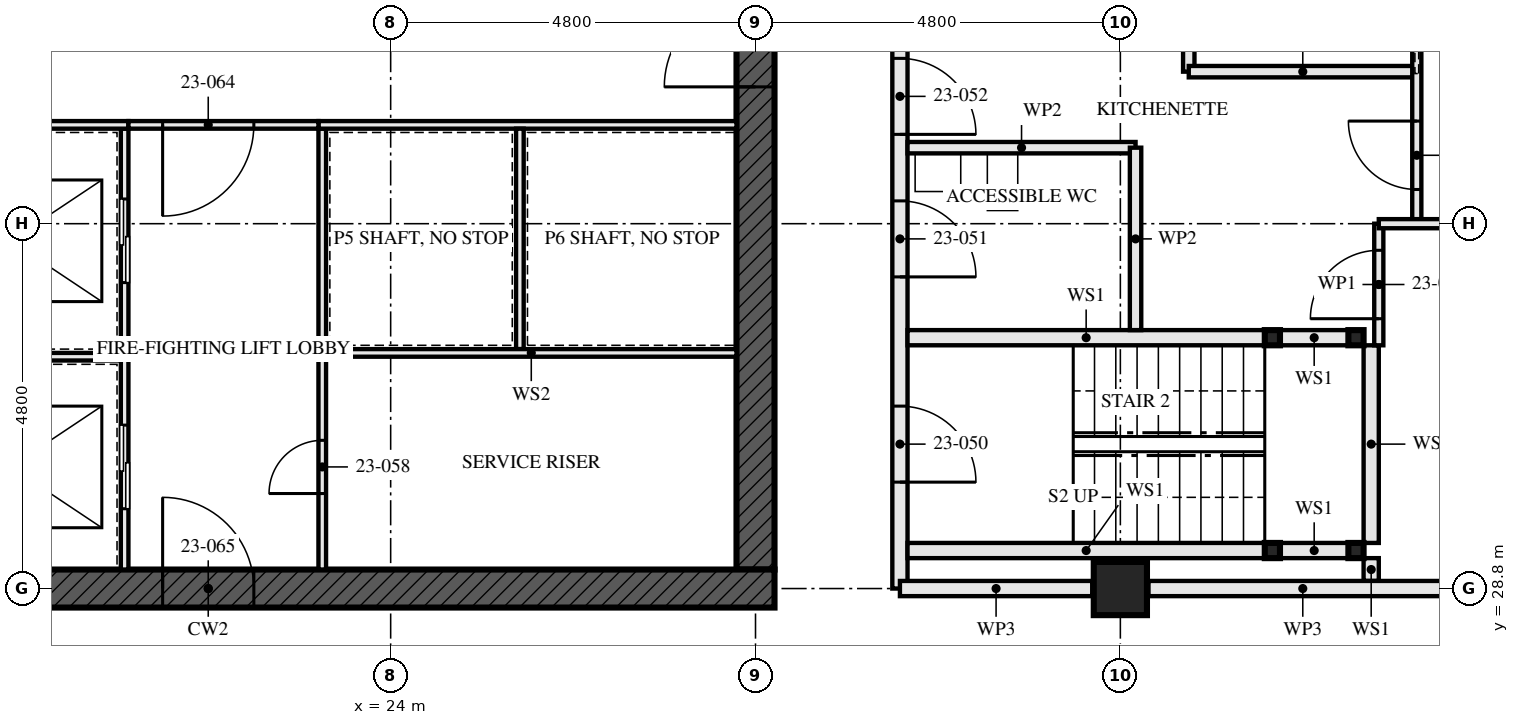
"""IFC4 building model, lengths in metres.
Left out: names, types, materials, properties, quantities, classifications, styles, units other than length and angle.
Written with IfcOpenShell. Run it as: python <this file> out.ifc"""

import sys

from ifc_helpers import new_model, si_unit, direction, frame, frame_2d, origin, origin_2d, place, context, subcontext, project, spatial, rectangle, hollow_rectangle, extrude, element, fill, save


model = new_model("IFC4")
c1 = context("Model", 3, precision=1e-05, world=origin(), true_north=direction((0.0, 1.0)))
c2 = subcontext(c1, "Body", "Model", "MODEL_VIEW")
j1 = project(units=[si_unit("LENGTHUNIT", "METRE"), si_unit("PLANEANGLEUNIT", "RADIAN")], contexts=[c1])
p1 = place(None, origin())
s1 = spatial("IfcSite", under=j1, at=p1, CompositionType="ELEMENT")
p2 = place(p1, origin())
s2 = spatial("IfcBuilding", under=s1, at=p2, CompositionType="ELEMENT")
p3 = place(p2, frame((0.0, 0.0, 87.5)))
s3 = spatial("IfcBuildingStorey", under=s2, at=p3, CompositionType="ELEMENT", Elevation=87.5)
p4 = place(p3, frame((33.6, 28.8, 0.0), z_axis=(0.0, 0.0, 1.0), x_axis=(0.0, 1.0, 0.0)))
e1 = element("IfcColumn", 1, at=p4, inside=s3, PredefinedType="COLUMN", context=c2, shape_type="SweptSolid", body=[
    extrude(hollow_rectangle(XDim=0.7, YDim=0.7, WallThickness=0.06, at=origin_2d()), origin(), (0.0, 0.0, 1.0), 3.5),
])
p5 = place(p3, frame((14.15, 28.8, -0.17), z_axis=(0.0, 0.0, 1.0), x_axis=(1.0, 0.0, 0.0)))
e2 = element("IfcWall", 2, at=p5, inside=s3, PredefinedType="SHEAR", context=c2, shape_type="SweptSolid", body=[
    extrude(rectangle(XDim=14.9, YDim=0.5, at=frame_2d((7.45, 0.0))), origin(), (0.0, 0.0, 1.0), 3.5),
])
p6 = place(p5, frame((6.85, 0.0, 0.17)))
e3 = element("IfcOpeningElement", 3, at=p6, cuts=e2, PredefinedType="OPENING", context=c2, shape_type="SweptSolid", body=[
    extrude(rectangle(XDim=1.2, YDim=2.1, at=frame_2d((0.6, 1.05))), frame((0.0, 0.26, 0.0), z_axis=(0.0, -1.0, 0.0), x_axis=(1.0, 0.0, 0.0)), (0.0, 0.0, 1.0), 0.521),
])
p7 = place(p3, frame((28.8, 29.05, -0.17), z_axis=(0.0, 0.0, 1.0), x_axis=(0.0, 1.0, 0.0)))
e4 = element("IfcWall", 4, at=p7, inside=s3, PredefinedType="SHEAR", context=c2, shape_type="SweptSolid", body=[
    extrude(rectangle(XDim=13.9, YDim=0.5, at=frame_2d((6.95, 0.0))), origin(), (0.0, 0.0, 1.0), 3.5),
])
p8 = place(p7, frame((6.35, 0.0, 0.17)))
e5 = element("IfcOpeningElement", 5, at=p8, cuts=e4, PredefinedType="OPENING", context=c2, shape_type="SweptSolid", body=[
    extrude(rectangle(XDim=1.2, YDim=2.1, at=frame_2d((0.6, 1.05))), frame((0.0, 0.26, 0.0), z_axis=(0.0, -1.0, 0.0), x_axis=(1.0, 0.0, 0.0)), (0.0, 0.0, 1.0), 0.521),
])
for number, where, z_axis, x_axis in (
    (6, (36.7, 29.3, 0.0), (0.0, 0.0, 1.0), (1.0, 0.0, 0.0)),
    (7, (36.7, 32.1, 0.0), (0.0, 0.0, 1.0), (1.0, 0.0, 0.0)),
    (8, (35.6, 29.3, 0.0), (0.0, 0.0, 1.0), (1.0, 0.0, 0.0)),
    (9, (35.6, 32.1, 0.0), (0.0, 0.0, 1.0), (1.0, 0.0, 0.0)),
):
    element("IfcColumn", number, at=place(p3, frame(where, z_axis=z_axis, x_axis=x_axis)), inside=s3, PredefinedType="COLUMN", context=c2, shape_type="SweptSolid", body=[
        extrude(hollow_rectangle(XDim=0.2, YDim=0.2, WallThickness=0.008, at=origin_2d()), origin(), (0.0, 0.0, 1.0), 3.33),
    ])
p9 = place(p3, frame((36.6, 29.3, 0.0), z_axis=(0.0, 0.0, 1.0), x_axis=(-1.0, 0.0, 0.0)))
e10 = element("IfcWall", 10, at=p9, inside=s3, PredefinedType="SOLIDWALL", context=c2, shape_type="SweptSolid", body=[
    extrude(rectangle(XDim=0.9, YDim=0.2, at=frame_2d((0.45, 0.0))), origin(), (0.0, 0.0, 1.0), 2.99),
])
p10 = place(p3, frame((35.5, 29.3, 0.0), z_axis=(0.0, 0.0, 1.0), x_axis=(-1.0, 0.0, 0.0)))
e11 = element("IfcWall", 11, at=p10, inside=s3, PredefinedType="SOLIDWALL", context=c2, shape_type="SweptSolid", body=[
    extrude(rectangle(XDim=4.7, YDim=0.2, at=frame_2d((2.35, 0.0))), origin(), (0.0, 0.0, 1.0), 2.99),
])
p11 = place(p3, frame((36.6, 32.1, 0.0), z_axis=(0.0, 0.0, 1.0), x_axis=(-1.0, 0.0, 0.0)))
e12 = element("IfcWall", 12, at=p11, inside=s3, PredefinedType="SOLIDWALL", context=c2, shape_type="SweptSolid", body=[
    extrude(rectangle(XDim=0.9, YDim=0.2, at=frame_2d((0.45, 0.0))), origin(), (0.0, 0.0, 1.0), 2.99),
])
p12 = place(p3, frame((35.5, 32.1, 0.0), z_axis=(0.0, 0.0, 1.0), x_axis=(-1.0, 0.0, 0.0)))
e13 = element("IfcWall", 13, at=p12, inside=s3, PredefinedType="SOLIDWALL", context=c2, shape_type="SweptSolid", body=[
    extrude(rectangle(XDim=4.7, YDim=0.2, at=frame_2d((2.35, 0.0))), origin(), (0.0, 0.0, 1.0), 2.99),
])
p13 = place(p3, frame((36.9, 28.9, 0.0), z_axis=(0.0, 0.0, 1.0), x_axis=(0.0, 1.0, 0.0)))
e14 = element("IfcWall", 14, at=p13, inside=s3, PredefinedType="SOLIDWALL", context=c2, shape_type="SweptSolid", body=[
    extrude(rectangle(XDim=0.3, YDim=0.2, at=frame_2d((0.15, 0.0))), origin(), (0.0, 0.0, 1.0), 3.33),
])
p14 = place(p3, frame((36.9, 29.4, 0.0), z_axis=(0.0, 0.0, 1.0), x_axis=(0.0, 1.0, 0.0)))
e15 = element("IfcWall", 15, at=p14, inside=s3, PredefinedType="SOLIDWALL", context=c2, shape_type="SweptSolid", body=[
    extrude(rectangle(XDim=2.6, YDim=0.2, at=frame_2d((1.3, 0.0))), origin(), (0.0, 0.0, 1.0), 3.33),
])
p15 = place(p3, frame((33.8, 32.2, 0.0), z_axis=(0.0, 0.0, 1.0), x_axis=(0.0, 1.0, 0.0)))
e16 = element("IfcWall", 16, at=p15, inside=s3, PredefinedType="PARTITIONING", context=c2, shape_type="SweptSolid", body=[
    extrude(rectangle(XDim=2.4, YDim=0.15, at=frame_2d((1.2, 0.0))), origin(), (0.0, 0.0, 1.0), 2.55),
])
for number, where, z_axis, x_axis in (
    (17, (33.8, 34.6, 0.0), (0.0, 0.0, 1.0), (-1.0, 0.0, 0.0)),
    (18, (37.5, 35.6, 0.0), (0.0, 0.0, 1.0), (-1.0, 0.0, 0.0)),
):
    element("IfcWall", number, at=place(p3, frame(where, z_axis=z_axis, x_axis=x_axis)), inside=s3, PredefinedType="PARTITIONING", context=c2, shape_type="SweptSolid", body=[
        extrude(rectangle(XDim=3.0, YDim=0.15, at=frame_2d((1.5, 0.0))), origin(), (0.0, 0.0, 1.0), 3.33),
    ])
p16 = place(p3, frame((34.5, 35.6, 0.0), z_axis=(0.0, 0.0, 1.0), x_axis=(0.0, 1.0, 0.0)))
e19 = element("IfcWall", 19, at=p16, inside=s3, PredefinedType="PARTITIONING", context=c2, shape_type="SweptSolid", body=[
    extrude(rectangle(XDim=2.8, YDim=0.15, at=frame_2d((1.4, 0.0))), origin(), (0.0, 0.0, 1.0), 3.33),
])
p17 = place(p3, frame((37.0, 32.0, 0.0), z_axis=(0.0, 0.0, 1.0), x_axis=(0.0, 1.0, 0.0)))
e20 = element("IfcWall", 20, at=p17, inside=s3, PredefinedType="PARTITIONING", context=c2, shape_type="SweptSolid", body=[
    extrude(rectangle(XDim=1.6, YDim=0.12, at=frame_2d((0.8, 0.0))), origin(), (0.0, 0.0, 1.0), 3.33),
])
p18 = place(p17, frame((0.35, 0.0, 0.0)))
e21 = element("IfcOpeningElement", 21, at=p18, cuts=e20, PredefinedType="OPENING", context=c2, shape_type="SweptSolid", body=[
    extrude(rectangle(XDim=0.9, YDim=2.1, at=frame_2d((0.45, 1.05))), frame((0.0, 0.071, 0.0), z_axis=(0.0, -1.0, 0.0), x_axis=(1.0, 0.0, 0.0)), (0.0, 0.0, 1.0), 0.141),
])
p19 = place(p3, frame((37.5, 33.6, 0.0), z_axis=(0.0, 0.0, 1.0), x_axis=(0.0, 1.0, 0.0)))
e22 = element("IfcWall", 22, at=p19, inside=s3, PredefinedType="PARTITIONING", context=c2, shape_type="SweptSolid", body=[
    extrude(rectangle(XDim=4.8, YDim=0.12, at=frame_2d((2.4, 0.0))), origin(), (0.0, 0.0, 1.0), 3.33),
])
p20 = place(p19, frame((0.45, 0.0, 0.0)))
e23 = element("IfcOpeningElement", 23, at=p20, cuts=e22, PredefinedType="OPENING", context=c2, shape_type="SweptSolid", body=[
    extrude(rectangle(XDim=0.9, YDim=2.1, at=frame_2d((0.45, 1.05))), frame((0.0, 0.071, 0.0), z_axis=(0.0, -1.0, 0.0), x_axis=(1.0, 0.0, 0.0)), (0.0, 0.0, 1.0), 0.141),
])
p21 = place(p19, frame((2.925, 0.0, 0.0)))
e24 = element("IfcOpeningElement", 24, at=p21, cuts=e22, PredefinedType="OPENING", context=c2, shape_type="SweptSolid", body=[
    extrude(rectangle(XDim=0.95, YDim=2.1, at=frame_2d((0.475, 1.05))), frame((0.0, 0.071, 0.0), z_axis=(0.0, -1.0, 0.0), x_axis=(1.0, 0.0, 0.0)), (0.0, 0.0, 1.0), 0.141),
])
p22 = place(p3, frame((42.855, 33.6, 0.0), z_axis=(0.0, 0.0, 1.0), x_axis=(-1.0, 0.0, 0.0)))
e25 = element("IfcWall", 25, at=p22, inside=s3, PredefinedType="PARTITIONING", context=c2, shape_type="SweptSolid", body=[
    extrude(rectangle(XDim=5.855, YDim=0.12, at=frame_2d((2.927, 0.0))), origin(), (0.0, 0.0, 1.0), 2.55),
])
p23 = place(p3, frame((30.7, 28.8, 0.0), z_axis=(0.0, 0.0, 1.0), x_axis=(0.0, 1.0, 0.0)))
e26 = element("IfcWall", 26, at=p23, inside=s3, PredefinedType="PARTITIONING", context=c2, shape_type="SweptSolid", body=[
    extrude(rectangle(XDim=14.84, YDim=0.2, at=frame_2d((7.42, 0.0))), origin(), (0.0, 0.0, 1.0), 2.32),
])
p24 = place(p23, frame((1.4, 0.0, 0.0)))
e27 = element("IfcOpeningElement", 27, at=p24, cuts=e26, PredefinedType="OPENING", context=c2, shape_type="SweptSolid", body=[
    extrude(rectangle(XDim=1.0, YDim=2.1, at=frame_2d((0.5, 1.05))), frame((0.0, 0.111, 0.0), z_axis=(0.0, -1.0, 0.0), x_axis=(1.0, 0.0, 0.0)), (0.0, 0.0, 1.0), 0.221),
])
p25 = place(p23, frame((4.1, 0.0, 0.0)))
e28 = element("IfcOpeningElement", 28, at=p25, cuts=e26, PredefinedType="OPENING", context=c2, shape_type="SweptSolid", body=[
    extrude(rectangle(XDim=1.0, YDim=2.1, at=frame_2d((0.5, 1.05))), frame((0.0, 0.111, 0.0), z_axis=(0.0, -1.0, 0.0), x_axis=(1.0, 0.0, 0.0)), (0.0, 0.0, 1.0), 0.221),
])
p26 = place(p23, frame((5.975, 0.0, 0.0)))
e29 = element("IfcOpeningElement", 29, at=p26, cuts=e26, PredefinedType="OPENING", context=c2, shape_type="SweptSolid", body=[
    extrude(rectangle(XDim=1.0, YDim=2.1, at=frame_2d((0.5, 1.05))), frame((0.0, 0.111, 0.0), z_axis=(0.0, -1.0, 0.0), x_axis=(1.0, 0.0, 0.0)), (0.0, 0.0, 1.0), 0.221),
])
p27 = place(p23, frame((13.0, 0.0, 0.0)))
e30 = element("IfcOpeningElement", 30, at=p27, cuts=e26, PredefinedType="OPENING", context=c2, shape_type="SweptSolid", body=[
    extrude(rectangle(XDim=1.0, YDim=2.1, at=frame_2d((0.5, 1.05))), frame((0.0, 0.111, 0.0), z_axis=(0.0, -1.0, 0.0), x_axis=(1.0, 0.0, 0.0)), (0.0, 0.0, 1.0), 0.221),
])
p28 = place(p3, frame((20.5, 29.05, 0.0), z_axis=(0.0, 0.0, 1.0), x_axis=(0.0, 1.0, 0.0)))
e31 = element("IfcWall", 31, at=p28, inside=s3, PredefinedType="SOLIDWALL", context=c2, shape_type="SweptSolid", body=[
    extrude(rectangle(XDim=5.8, YDim=0.1, at=frame_2d((2.9, 0.0))), origin(), (0.0, 0.0, 1.0), 3.33),
])
p29 = place(p28, frame((0.8, 0.0, 0.0)))
e32 = element("IfcOpeningElement", 32, at=p29, cuts=e31, PredefinedType="OPENING", context=c2, shape_type="SweptSolid", body=[
    extrude(rectangle(XDim=1.1, YDim=2.3, at=frame_2d((0.55, 1.15))), frame((0.0, 0.061, 0.0), z_axis=(0.0, -1.0, 0.0), x_axis=(1.0, 0.0, 0.0)), (0.0, 0.0, 1.0), 0.121),
])
p30 = place(p28, frame((3.775, 0.0, 0.0)))
e33 = element("IfcOpeningElement", 33, at=p30, cuts=e31, PredefinedType="OPENING", context=c2, shape_type="SweptSolid", body=[
    extrude(rectangle(XDim=1.1, YDim=2.3, at=frame_2d((0.55, 1.15))), frame((0.0, 0.061, 0.0), z_axis=(0.0, -1.0, 0.0), x_axis=(1.0, 0.0, 0.0)), (0.0, 0.0, 1.0), 0.121),
])
p31 = place(p3, frame((23.1, 29.05, 0.0), z_axis=(0.0, 0.0, 1.0), x_axis=(0.0, 1.0, 0.0)))
e34 = element("IfcWall", 34, at=p31, inside=s3, PredefinedType="SOLIDWALL", context=c2, shape_type="SweptSolid", body=[
    extrude(rectangle(XDim=5.8, YDim=0.1, at=frame_2d((2.9, 0.0))), origin(), (0.0, 0.0, 1.0), 3.33),
])
p32 = place(p31, frame((1.0, 0.0, 0.0)))
e35 = element("IfcOpeningElement", 35, at=p32, cuts=e34, PredefinedType="OPENING", context=c2, shape_type="SweptSolid", body=[
    extrude(rectangle(XDim=0.7, YDim=2.1, at=frame_2d((0.35, 1.05))), frame((0.0, 0.061, 0.0), z_axis=(0.0, -1.0, 0.0), x_axis=(1.0, 0.0, 0.0)), (0.0, 0.0, 1.0), 0.121),
])
p33 = place(p3, frame((14.65, 34.9, 0.0), z_axis=(0.0, 0.0, 1.0), x_axis=(1.0, 0.0, 0.0)))
e36 = element("IfcWall", 36, at=p33, inside=s3, PredefinedType="SOLIDWALL", context=c2, shape_type="SweptSolid", body=[
    extrude(rectangle(XDim=5.9, YDim=0.1, at=frame_2d((2.95, 0.0))), origin(), (0.0, 0.0, 1.0), 3.33),
])
p34 = place(p33, frame((1.6, 0.0, 0.0)))
e37 = element("IfcOpeningElement", 37, at=p34, cuts=e36, PredefinedType="OPENING", context=c2, shape_type="SweptSolid", body=[
    extrude(rectangle(XDim=0.7, YDim=2.1, at=frame_2d((0.35, 1.05))), frame((0.0, 0.061, 0.0), z_axis=(0.0, -1.0, 0.0), x_axis=(1.0, 0.0, 0.0)), (0.0, 0.0, 1.0), 0.121),
])
p35 = place(p3, frame((23.05, 34.9, 0.0), z_axis=(0.0, 0.0, 1.0), x_axis=(1.0, 0.0, 0.0)))
e38 = element("IfcWall", 38, at=p35, inside=s3, PredefinedType="SOLIDWALL", context=c2, shape_type="SweptSolid", body=[
    extrude(rectangle(XDim=5.5, YDim=0.1, at=frame_2d((2.75, 0.0))), origin(), (0.0, 0.0, 1.0), 3.33),
])
p36 = place(p3, frame((20.55, 34.9, 0.0), z_axis=(0.0, 0.0, 1.0), x_axis=(1.0, 0.0, 0.0)))
e39 = element("IfcWall", 39, at=p36, inside=s3, PredefinedType="SOLIDWALL", context=c2, shape_type="SweptSolid", body=[
    extrude(rectangle(XDim=2.5, YDim=0.1, at=frame_2d((1.25, 0.0))), origin(), (0.0, 0.0, 1.0), 3.33),
])
p37 = place(p36, frame((0.45, 0.0, 0.0)))
e40 = element("IfcOpeningElement", 40, at=p37, cuts=e39, PredefinedType="OPENING", context=c2, shape_type="SweptSolid", body=[
    extrude(rectangle(XDim=1.2, YDim=2.1, at=frame_2d((0.6, 1.05))), frame((0.0, 0.061, 0.0), z_axis=(0.0, -1.0, 0.0), x_axis=(1.0, 0.0, 0.0)), (0.0, 0.0, 1.0), 0.121),
])
p38 = place(p3, frame((17.55, 31.85, 0.0), z_axis=(0.0, 0.0, 1.0), x_axis=(1.0, 0.0, 0.0)))
e41 = element("IfcWall", 41, at=p38, inside=s3, PredefinedType="SOLIDWALL", context=c2, shape_type="SweptSolid", body=[
    extrude(rectangle(XDim=2.9, YDim=0.1, at=frame_2d((1.45, 0.0))), origin(), (0.0, 0.0, 1.0), 3.33),
])
p39 = place(p3, frame((25.7, 31.95, 0.0), z_axis=(0.0, 0.0, 1.0), x_axis=(0.0, 1.0, 0.0)))
e42 = element("IfcWall", 42, at=p39, inside=s3, PredefinedType="SOLIDWALL", context=c2, shape_type="SweptSolid", body=[
    extrude(rectangle(XDim=2.9, YDim=0.1, at=frame_2d((1.45, 0.0))), origin(), (0.0, 0.0, 1.0), 3.33),
])
p40 = place(p3, frame((23.15, 31.9, 0.0), z_axis=(0.0, 0.0, 1.0), x_axis=(1.0, 0.0, 0.0)))
e43 = element("IfcWall", 43, at=p40, inside=s3, PredefinedType="SOLIDWALL", context=c2, shape_type="SweptSolid", body=[
    extrude(rectangle(XDim=5.4, YDim=0.1, at=frame_2d((2.7, 0.0))), origin(), (0.0, 0.0, 1.0), 3.33),
])
p41 = place(p3, frame((38.03, 28.8, 0.0), z_axis=(0.0, 0.0, 1.0), x_axis=(-1.0, 0.0, 0.0)))
e44 = element("IfcWall", 44, at=p41, inside=s3, PredefinedType="PARTITIONING", context=c2, shape_type="SweptSolid", body=[
    extrude(rectangle(XDim=4.06, YDim=0.2, at=frame_2d((2.03, 0.0))), origin(), (0.0, 0.0, 1.0), 2.32),
])
p42 = place(p3, frame((33.23, 28.8, 0.0), z_axis=(0.0, 0.0, 1.0), x_axis=(-1.0, 0.0, 0.0)))
e45 = element("IfcWall", 45, at=p42, inside=s3, PredefinedType="PARTITIONING", context=c2, shape_type="SweptSolid", body=[
    extrude(rectangle(XDim=2.53, YDim=0.2, at=frame_2d((1.265, 0.0))), origin(), (0.0, 0.0, 1.0), 2.32),
])
p43 = place(p18, origin())
e46 = element("IfcDoor", 46, at=p43, inside=s3, OperationType="SINGLE_SWING_RIGHT", PredefinedType="DOOR", context=c2, shape_type="SweptSolid", body=[
    extrude(rectangle(XDim=0.9, YDim=2.1, at=frame_2d((0.45, 1.05))), frame((0.0, 0.022, 0.0), z_axis=(0.0, -1.0, 0.0), x_axis=(1.0, 0.0, 0.0)), (0.0, 0.0, 1.0), 0.044),
])
fill(e21, e46)
p44 = place(p20, origin())
e47 = element("IfcDoor", 47, at=p44, inside=s3, OperationType="SINGLE_SWING_LEFT", PredefinedType="DOOR", context=c2, shape_type="SweptSolid", body=[
    extrude(rectangle(XDim=0.9, YDim=2.1, at=frame_2d((0.45, 1.05))), frame((0.0, 0.022, 0.0), z_axis=(0.0, -1.0, 0.0), x_axis=(1.0, 0.0, 0.0)), (0.0, 0.0, 1.0), 0.044),
])
fill(e23, e47)
p45 = place(p24, frame((1.0, 0.0, 0.0), z_axis=(0.0, 0.0, 1.0), x_axis=(-1.0, 0.0, 0.0)))
e48 = element("IfcDoor", 48, at=p45, inside=s3, OperationType="SINGLE_SWING_LEFT", PredefinedType="DOOR", context=c2, shape_type="SweptSolid", body=[
    extrude(rectangle(XDim=1.0, YDim=2.1, at=frame_2d((0.5, 1.05))), frame((0.0, 0.032, 0.0), z_axis=(0.0, -1.0, 0.0), x_axis=(1.0, 0.0, 0.0)), (0.0, 0.0, 1.0), 0.064),
])
fill(e27, e48)
p46 = place(p25, frame((1.0, 0.0, 0.0), z_axis=(0.0, 0.0, 1.0), x_axis=(-1.0, 0.0, 0.0)))
e49 = element("IfcDoor", 49, at=p46, inside=s3, OperationType="SINGLE_SWING_LEFT", PredefinedType="DOOR", context=c2, shape_type="SweptSolid", body=[
    extrude(rectangle(XDim=1.0, YDim=2.1, at=frame_2d((0.5, 1.05))), frame((0.0, 0.027, 0.0), z_axis=(0.0, -1.0, 0.0), x_axis=(1.0, 0.0, 0.0)), (0.0, 0.0, 1.0), 0.054),
])
fill(e28, e49)
p47 = place(p26, frame((1.0, 0.0, 0.0), z_axis=(0.0, 0.0, 1.0), x_axis=(-1.0, 0.0, 0.0)))
e50 = element("IfcDoor", 50, at=p47, inside=s3, OperationType="SINGLE_SWING_LEFT", PredefinedType="DOOR", context=c2, shape_type="SweptSolid", body=[
    extrude(rectangle(XDim=1.0, YDim=2.1, at=frame_2d((0.5, 1.05))), frame((0.0, 0.027, 0.0), z_axis=(0.0, -1.0, 0.0), x_axis=(1.0, 0.0, 0.0)), (0.0, 0.0, 1.0), 0.054),
])
fill(e29, e50)
p48 = place(p29, origin())
e51 = element("IfcDoor", 51, at=p48, inside=s3, OperationType="SLIDING_TO_LEFT", PredefinedType="DOOR", context=c2, shape_type="SweptSolid", body=[
    extrude(rectangle(XDim=1.1, YDim=2.3, at=frame_2d((0.55, 1.15))), frame((0.0, 0.05, 0.0), z_axis=(0.0, -1.0, 0.0), x_axis=(1.0, 0.0, 0.0)), (0.0, 0.0, 1.0), 0.1),
])
fill(e32, e51)
p49 = place(p30, origin())
e52 = element("IfcDoor", 52, at=p49, inside=s3, OperationType="SLIDING_TO_LEFT", PredefinedType="DOOR", context=c2, shape_type="SweptSolid", body=[
    extrude(rectangle(XDim=1.1, YDim=2.3, at=frame_2d((0.55, 1.15))), frame((0.0, 0.05, 0.0), z_axis=(0.0, -1.0, 0.0), x_axis=(1.0, 0.0, 0.0)), (0.0, 0.0, 1.0), 0.1),
])
fill(e33, e52)
p50 = place(p32, origin())
e53 = element("IfcDoor", 53, at=p50, inside=s3, OperationType="SINGLE_SWING_RIGHT", PredefinedType="DOOR", context=c2, shape_type="SweptSolid", body=[
    extrude(rectangle(XDim=0.7, YDim=2.1, at=frame_2d((0.35, 1.05))), frame((0.0, 0.027, 0.0), z_axis=(0.0, -1.0, 0.0), x_axis=(1.0, 0.0, 0.0)), (0.0, 0.0, 1.0), 0.054),
])
fill(e35, e53)
p51 = place(p37, frame((1.2, 0.0, 0.0), z_axis=(0.0, 0.0, 1.0), x_axis=(-1.0, 0.0, 0.0)))
e54 = element("IfcDoor", 54, at=p51, inside=s3, OperationType="SINGLE_SWING_LEFT", PredefinedType="DOOR", context=c2, shape_type="SweptSolid", body=[
    extrude(rectangle(XDim=1.2, YDim=2.1, at=frame_2d((0.6, 1.05))), frame((0.0, 0.027, 0.0), z_axis=(0.0, -1.0, 0.0), x_axis=(1.0, 0.0, 0.0)), (0.0, 0.0, 1.0), 0.054),
])
fill(e40, e54)
p52 = place(p6, origin())
e55 = element("IfcDoor", 55, at=p52, inside=s3, OperationType="SINGLE_SWING_LEFT", PredefinedType="DOOR", context=c2, shape_type="SweptSolid", body=[
    extrude(rectangle(XDim=1.2, YDim=2.1, at=frame_2d((0.6, 1.05))), frame((0.0, 0.027, 0.0), z_axis=(0.0, -1.0, 0.0), x_axis=(1.0, 0.0, 0.0)), (0.0, 0.0, 1.0), 0.054),
])
fill(e3, e55)
p53 = place(p8, origin())
e56 = element("IfcDoor", 56, at=p53, inside=s3, OperationType="SINGLE_SWING_LEFT", PredefinedType="DOOR", context=c2, shape_type="SweptSolid", body=[
    extrude(rectangle(XDim=1.2, YDim=2.1, at=frame_2d((0.6, 1.05))), frame((0.0, 0.027, 0.0), z_axis=(0.0, -1.0, 0.0), x_axis=(1.0, 0.0, 0.0)), (0.0, 0.0, 1.0), 0.054),
])
fill(e5, e56)
save(model, sys.argv[1])
